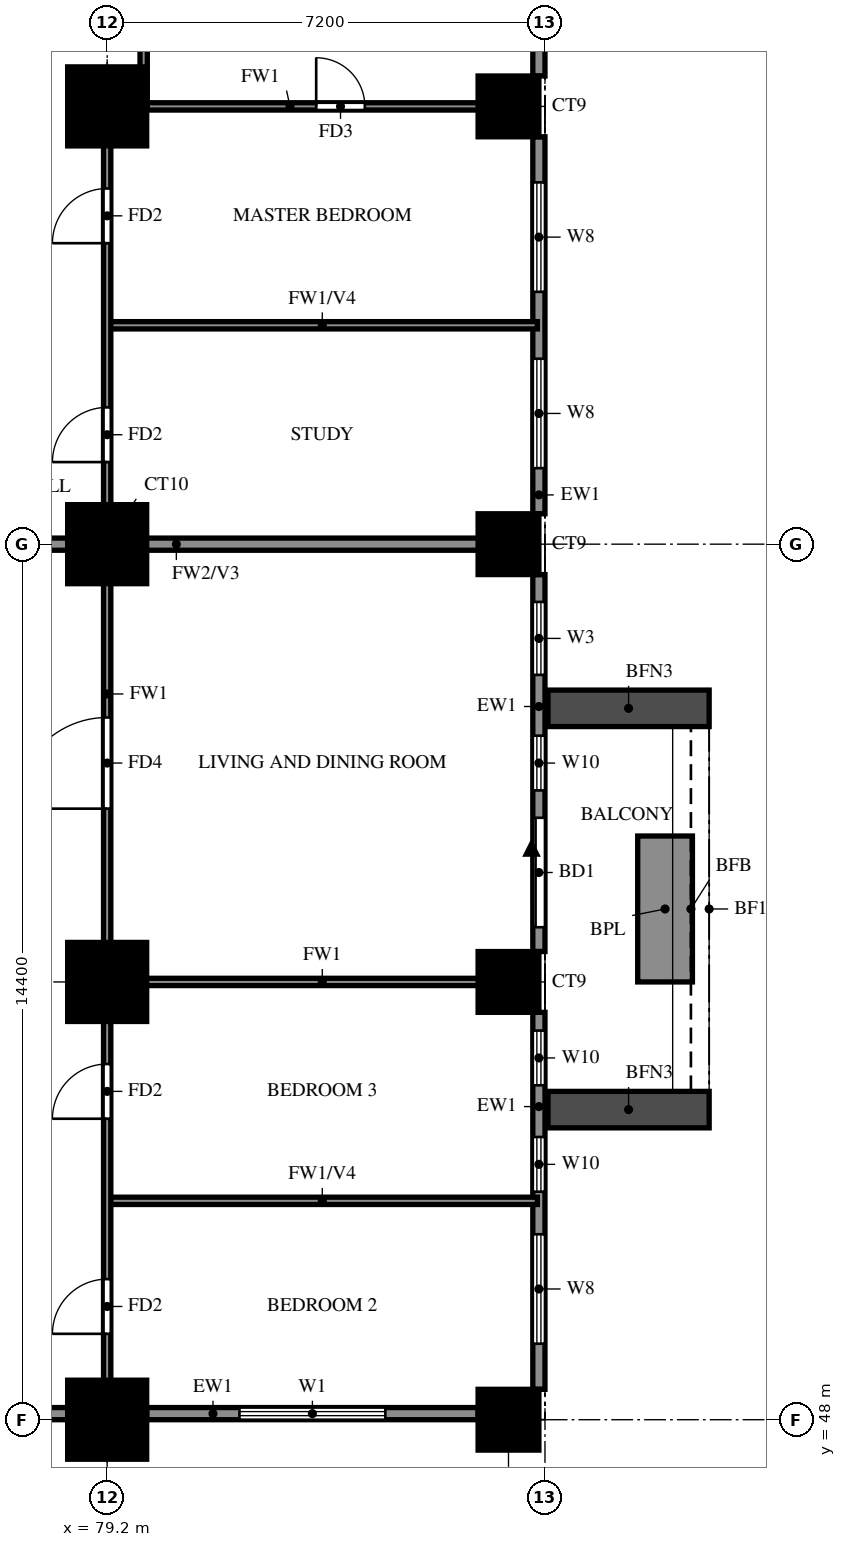
"""IFC4 building model, lengths in metres.
Left out: names, types, materials, properties, quantities, classifications, styles, units other than length and angle.
Written with IfcOpenShell. Run it as: python <this file> out.ifc"""

import sys

from ifc_helpers import new_model, si_unit, direction, frame, frame_2d, origin, origin_2d, place, context, subcontext, project, spatial, rectangle, extrude, source, transform, mapped, element, fill, save


model = new_model("IFC4")
c1 = context("Model", 3, precision=1e-05, world=origin(), true_north=direction((0.0, 1.0)))
c2 = subcontext(c1, "Body", "Model", "MODEL_VIEW")
j1 = project(units=[si_unit("LENGTHUNIT", "METRE"), si_unit("PLANEANGLEUNIT", "RADIAN")], contexts=[c1])
p1 = place(None, origin())
s1 = spatial("IfcSite", under=j1, at=p1, CompositionType="ELEMENT")
p2 = place(p1, origin())
s2 = spatial("IfcBuilding", under=s1, at=p2, CompositionType="ELEMENT")
p3 = place(p2, frame((0.0, 0.0, 69.0)))
s3 = spatial("IfcBuildingStorey", under=s2, at=p3, CompositionType="ELEMENT", Elevation=69.0)
m1 = source(origin(), c2, "Body", "SweptSolid", [
    extrude(rectangle(XDim=1.3, YDim=1.3, at=origin_2d()), origin(), (0.0, 0.0, 1.0), 3.18),
])
p4 = place(p3, frame((79.2, 48.0, 0.0), z_axis=(0.0, 0.0, 1.0), x_axis=(1.0, 0.0, 0.0)))
e1 = element("IfcColumn", 1, at=p4, inside=s3, PredefinedType="COLUMN", context=c2, shape_type="MappedRepresentation", body=[
    mapped(m1, transform((0.0, 0.0, 0.0))),
])
m2 = source(origin(), c2, "Body", "SweptSolid", [
    extrude(rectangle(XDim=1.0, YDim=1.0, at=origin_2d()), origin(), (0.0, 0.0, 1.0), 3.18),
])
p5 = place(p3, frame((85.8, 48.0, 0.0), z_axis=(0.0, 0.0, 1.0), x_axis=(1.0, 0.0, 0.0)))
e2 = element("IfcColumn", 2, at=p5, inside=s3, PredefinedType="COLUMN", context=c2, shape_type="MappedRepresentation", body=[
    mapped(m2, transform((0.0, 0.0, 0.0))),
])
p6 = place(p3, frame((79.2, 55.2, 0.0), z_axis=(0.0, 0.0, 1.0), x_axis=(1.0, 0.0, 0.0)))
e3 = element("IfcColumn", 3, at=p6, inside=s3, PredefinedType="COLUMN", context=c2, shape_type="MappedRepresentation", body=[
    mapped(m1, transform((0.0, 0.0, 0.0))),
])
p7 = place(p3, frame((85.8, 55.2, 0.0), z_axis=(0.0, 0.0, 1.0), x_axis=(1.0, 0.0, 0.0)))
e4 = element("IfcColumn", 4, at=p7, inside=s3, PredefinedType="COLUMN", context=c2, shape_type="MappedRepresentation", body=[
    mapped(m2, transform((0.0, 0.0, 0.0))),
])
p8 = place(p3, frame((79.2, 62.4, 0.0), z_axis=(0.0, 0.0, 1.0), x_axis=(1.0, 0.0, 0.0)))
e5 = element("IfcColumn", 5, at=p8, inside=s3, PredefinedType="COLUMN", context=c2, shape_type="MappedRepresentation", body=[
    mapped(m1, transform((0.0, 0.0, 0.0))),
])
p9 = place(p3, frame((85.8, 62.4, 0.0), z_axis=(0.0, 0.0, 1.0), x_axis=(1.0, 0.0, 0.0)))
e6 = element("IfcColumn", 6, at=p9, inside=s3, PredefinedType="COLUMN", context=c2, shape_type="MappedRepresentation", body=[
    mapped(m2, transform((0.0, 0.0, 0.0))),
])
p10 = place(p3, frame((79.2, 69.6, 0.0), z_axis=(0.0, 0.0, 1.0), x_axis=(1.0, 0.0, 0.0)))
e7 = element("IfcColumn", 7, at=p10, inside=s3, PredefinedType="COLUMN", context=c2, shape_type="MappedRepresentation", body=[
    mapped(m1, transform((0.0, 0.0, 0.0))),
])
p11 = place(p3, frame((85.8, 69.6, 0.0), z_axis=(0.0, 0.0, 1.0), x_axis=(1.0, 0.0, 0.0)))
e8 = element("IfcColumn", 8, at=p11, inside=s3, PredefinedType="COLUMN", context=c2, shape_type="MappedRepresentation", body=[
    mapped(m2, transform((0.0, 0.0, 0.0))),
])
p12 = place(p3, frame((85.996, 33.863, 0.0), z_axis=(0.0, 0.0, 1.0), x_axis=(-0.707100718496, 0.707112843825, 0.0)))
e9 = element("IfcWall", 9, at=p12, inside=s3, PredefinedType="SOLIDWALL", context=c2, shape_type="SweptSolid", body=[
    extrude(rectangle(XDim=20.135, YDim=0.2, at=frame_2d((10.067, 0.0))), origin(), (0.0, 0.0, 1.0), 3.18),
])
p13 = place(p3, frame((71.989, 48.1, 0.0), z_axis=(0.0, 0.0, 1.0), x_axis=(1.0, 0.0, 0.0)))
e10 = element("IfcWall", 10, at=p13, inside=s3, PredefinedType="SOLIDWALL", context=c2, shape_type="SweptSolid", body=[
    extrude(rectangle(XDim=6.562, YDim=0.2, at=frame_2d((3.281, 0.0))), origin(), (0.0, 0.0, 1.0), 3.18),
])
p14 = place(p3, frame((79.85, 48.1, 0.0), z_axis=(0.0, 0.0, 1.0), x_axis=(1.0, 0.0, 0.0)))
e11 = element("IfcWall", 11, at=p14, inside=s3, PredefinedType="SOLIDWALL", context=c2, shape_type="SweptSolid", body=[
    extrude(rectangle(XDim=5.45, YDim=0.2, at=frame_2d((2.725, 0.0))), origin(), (0.0, 0.0, 1.0), 3.18),
])
p15 = place(p14, frame((1.525, 0.0, 0.6)))
e12 = element("IfcOpeningElement", 12, at=p15, cuts=e11, PredefinedType="OPENING", context=c2, shape_type="SweptSolid", body=[
    extrude(rectangle(XDim=2.4, YDim=2.4, at=frame_2d((1.2, 1.2))), frame((0.0, 0.11, 0.0), z_axis=(0.0, -1.0, 0.0), x_axis=(1.0, 0.0, 0.0)), (0.0, 0.0, 1.0), 0.22),
])
p16 = place(p3, frame((86.3, 48.5, 0.0), z_axis=(0.0, 0.0, 1.0), x_axis=(0.0, 1.0, 0.0)))
e13 = element("IfcWall", 13, at=p16, inside=s3, PredefinedType="SOLIDWALL", context=c2, shape_type="SweptSolid", body=[
    extrude(rectangle(XDim=6.2, YDim=0.2, at=frame_2d((3.1, 0.0))), origin(), (0.0, 0.0, 1.0), 3.18),
])
p17 = place(p16, frame((0.75, 0.0, 0.6)))
e14 = element("IfcOpeningElement", 14, at=p17, cuts=e13, PredefinedType="OPENING", context=c2, shape_type="SweptSolid", body=[
    extrude(rectangle(XDim=1.8, YDim=2.4, at=frame_2d((0.9, 1.2))), frame((0.0, 0.11, 0.0), z_axis=(0.0, -1.0, 0.0), x_axis=(1.0, 0.0, 0.0)), (0.0, 0.0, 1.0), 0.22),
])
p18 = place(p16, frame((3.25, 0.0, 0.6)))
e15 = element("IfcOpeningElement", 15, at=p18, cuts=e13, PredefinedType="OPENING", context=c2, shape_type="SweptSolid", body=[
    extrude(rectangle(XDim=0.9, YDim=2.4, at=frame_2d((0.45, 1.2))), frame((0.0, 0.11, 0.0), z_axis=(0.0, -1.0, 0.0), x_axis=(1.0, 0.0, 0.0)), (0.0, 0.0, 1.0), 0.22),
])
p19 = place(p16, frame((5.0, 0.0, 0.6)))
e16 = element("IfcOpeningElement", 16, at=p19, cuts=e13, PredefinedType="OPENING", context=c2, shape_type="SweptSolid", body=[
    extrude(rectangle(XDim=0.9, YDim=2.4, at=frame_2d((0.45, 1.2))), frame((0.0, 0.11, 0.0), z_axis=(0.0, -1.0, 0.0), x_axis=(1.0, 0.0, 0.0)), (0.0, 0.0, 1.0), 0.22),
])
p20 = place(p3, frame((86.3, 55.7, 0.0), z_axis=(0.0, 0.0, 1.0), x_axis=(0.0, 1.0, 0.0)))
e17 = element("IfcWall", 17, at=p20, inside=s3, PredefinedType="SOLIDWALL", context=c2, shape_type="SweptSolid", body=[
    extrude(rectangle(XDim=6.2, YDim=0.2, at=frame_2d((3.1, 0.0))), origin(), (0.0, 0.0, 1.0), 3.18),
])
p21 = place(p20, frame((0.4, 0.0, 0.0)))
e18 = element("IfcOpeningElement", 18, at=p21, cuts=e17, PredefinedType="OPENING", context=c2, shape_type="SweptSolid", body=[
    extrude(rectangle(XDim=1.8, YDim=2.4, at=frame_2d((0.9, 1.2))), frame((0.0, 0.11, 0.0), z_axis=(0.0, -1.0, 0.0), x_axis=(1.0, 0.0, 0.0)), (0.0, 0.0, 1.0), 0.22),
])
p22 = place(p20, frame((2.65, 0.0, 0.6)))
e19 = element("IfcOpeningElement", 19, at=p22, cuts=e17, PredefinedType="OPENING", context=c2, shape_type="SweptSolid", body=[
    extrude(rectangle(XDim=0.9, YDim=2.4, at=frame_2d((0.45, 1.2))), frame((0.0, 0.11, 0.0), z_axis=(0.0, -1.0, 0.0), x_axis=(1.0, 0.0, 0.0)), (0.0, 0.0, 1.0), 0.22),
])
p23 = place(p20, frame((4.55, 0.0, 0.6)))
e20 = element("IfcOpeningElement", 20, at=p23, cuts=e17, PredefinedType="OPENING", context=c2, shape_type="SweptSolid", body=[
    extrude(rectangle(XDim=1.2, YDim=2.4, at=frame_2d((0.6, 1.2))), frame((0.0, 0.11, 0.0), z_axis=(0.0, -1.0, 0.0), x_axis=(1.0, 0.0, 0.0)), (0.0, 0.0, 1.0), 0.22),
])
p24 = place(p3, frame((86.3, 62.9, 0.0), z_axis=(0.0, 0.0, 1.0), x_axis=(0.0, 1.0, 0.0)))
e21 = element("IfcWall", 21, at=p24, inside=s3, PredefinedType="SOLIDWALL", context=c2, shape_type="SweptSolid", body=[
    extrude(rectangle(XDim=6.2, YDim=0.2, at=frame_2d((3.1, 0.0))), origin(), (0.0, 0.0, 1.0), 3.18),
])
p25 = place(p24, frame((0.75, 0.0, 0.6)))
e22 = element("IfcOpeningElement", 22, at=p25, cuts=e21, PredefinedType="OPENING", context=c2, shape_type="SweptSolid", body=[
    extrude(rectangle(XDim=1.8, YDim=2.4, at=frame_2d((0.9, 1.2))), frame((0.0, 0.11, 0.0), z_axis=(0.0, -1.0, 0.0), x_axis=(1.0, 0.0, 0.0)), (0.0, 0.0, 1.0), 0.22),
])
p26 = place(p24, frame((3.65, 0.0, 0.6)))
e23 = element("IfcOpeningElement", 23, at=p26, cuts=e21, PredefinedType="OPENING", context=c2, shape_type="SweptSolid", body=[
    extrude(rectangle(XDim=1.8, YDim=2.4, at=frame_2d((0.9, 1.2))), frame((0.0, 0.11, 0.0), z_axis=(0.0, -1.0, 0.0), x_axis=(1.0, 0.0, 0.0)), (0.0, 0.0, 1.0), 0.22),
])
p27 = place(p3, frame((86.3, 70.1, 0.0), z_axis=(0.0, 0.0, 1.0), x_axis=(0.0, 1.0, 0.0)))
e24 = element("IfcWall", 24, at=p27, inside=s3, PredefinedType="SOLIDWALL", context=c2, shape_type="SweptSolid", body=[
    extrude(rectangle(XDim=6.2, YDim=0.2, at=frame_2d((3.1, 0.0))), origin(), (0.0, 0.0, 1.0), 3.18),
])
p28 = place(p27, frame((1.2, 0.0, 1.5)))
e25 = element("IfcOpeningElement", 25, at=p28, cuts=e24, PredefinedType="OPENING", context=c2, shape_type="SweptSolid", body=[
    extrude(rectangle(XDim=0.9, YDim=0.9, at=frame_2d((0.45, 0.45))), frame((0.0, 0.11, 0.0), z_axis=(0.0, -1.0, 0.0), x_axis=(1.0, 0.0, 0.0)), (0.0, 0.0, 1.0), 0.22),
])
p29 = place(p27, frame((3.65, 0.0, 0.6)))
e26 = element("IfcOpeningElement", 26, at=p29, cuts=e24, PredefinedType="OPENING", context=c2, shape_type="SweptSolid", body=[
    extrude(rectangle(XDim=1.8, YDim=2.4, at=frame_2d((0.9, 1.2))), frame((0.0, 0.11, 0.0), z_axis=(0.0, -1.0, 0.0), x_axis=(1.0, 0.0, 0.0)), (0.0, 0.0, 1.0), 0.22),
])
for number, where, z_axis, x_axis in (
    (27, (86.45, 53.1, 0.0), (0.0, 0.0, 1.0), (1.0, 0.0, 0.0)),
    (28, (86.45, 59.7, 0.0), (0.0, 0.0, 1.0), (1.0, 0.0, 0.0)),
):
    element("IfcWall", number, at=place(p3, frame(where, z_axis=z_axis, x_axis=x_axis)), inside=s3, PredefinedType="SOLIDWALL", context=c2, shape_type="SweptSolid", body=[
        extrude(rectangle(XDim=2.65, YDim=0.6, at=frame_2d((1.325, 0.0))), origin(), (0.0, 0.0, 1.0), 2.85),
    ])
p30 = place(p3, frame((88.375, 55.2, 0.0), z_axis=(0.0, 0.0, 1.0), x_axis=(0.0, 1.0, 0.0)))
e29 = element("IfcWall", 29, at=p30, inside=s3, PredefinedType="SOLIDWALL", context=c2, shape_type="SweptSolid", body=[
    extrude(rectangle(XDim=2.4, YDim=0.9, at=frame_2d((1.2, 0.0))), origin(), (0.0, 0.0, 1.0), 0.9),
])
p31 = place(p3, frame((74.4, 62.4, 0.0), z_axis=(0.0, 0.0, 1.0), x_axis=(1.0, 0.0, 0.0)))
e30 = element("IfcWall", 30, at=p31, inside=s3, PredefinedType="SOLIDWALL", context=c2, shape_type="SweptSolid", body=[
    extrude(rectangle(XDim=11.875, YDim=0.2, at=frame_2d((5.938, 0.0))), origin(), (0.0, 0.0, 1.0), 3.18),
])
p32 = place(p3, frame((79.2, 51.6, 0.0), z_axis=(0.0, 0.0, 1.0), x_axis=(1.0, 0.0, 0.0)))
e31 = element("IfcWall", 31, at=p32, inside=s3, PredefinedType="PARTITIONING", context=c2, shape_type="SweptSolid", body=[
    extrude(rectangle(XDim=7.075, YDim=0.12, at=frame_2d((3.538, 0.0))), origin(), (0.0, 0.0, 1.0), 2.28),
])
p33 = place(p3, frame((79.2, 55.2, 0.0), z_axis=(0.0, 0.0, 1.0), x_axis=(1.0, 0.0, 0.0)))
e32 = element("IfcWall", 32, at=p33, inside=s3, PredefinedType="PARTITIONING", context=c2, shape_type="SweptSolid", body=[
    extrude(rectangle(XDim=7.075, YDim=0.12, at=frame_2d((3.538, 0.0))), origin(), (0.0, 0.0, 1.0), 3.18),
])
p34 = place(p3, frame((79.2, 66.0, 0.0), z_axis=(0.0, 0.0, 1.0), x_axis=(1.0, 0.0, 0.0)))
e33 = element("IfcWall", 33, at=p34, inside=s3, PredefinedType="PARTITIONING", context=c2, shape_type="SweptSolid", body=[
    extrude(rectangle(XDim=7.075, YDim=0.12, at=frame_2d((3.538, 0.0))), origin(), (0.0, 0.0, 1.0), 2.28),
])
p35 = place(p3, frame((79.2, 69.6, 0.0), z_axis=(0.0, 0.0, 1.0), x_axis=(1.0, 0.0, 0.0)))
e34 = element("IfcWall", 34, at=p35, inside=s3, PredefinedType="PARTITIONING", context=c2, shape_type="SweptSolid", body=[
    extrude(rectangle(XDim=7.075, YDim=0.12, at=frame_2d((3.538, 0.0))), origin(), (0.0, 0.0, 1.0), 3.18),
])
p36 = place(p35, frame((3.438, 0.0, 0.0)))
e35 = element("IfcOpeningElement", 35, at=p36, cuts=e34, PredefinedType="OPENING", context=c2, shape_type="SweptSolid", body=[
    extrude(rectangle(XDim=0.8, YDim=2.1, at=frame_2d((0.4, 1.05))), frame((0.0, 0.07, 0.0), z_axis=(0.0, -1.0, 0.0), x_axis=(1.0, 0.0, 0.0)), (0.0, 0.0, 1.0), 0.14),
])
p37 = place(p3, frame((79.2, 48.125, 0.0), z_axis=(0.0, 0.0, 1.0), x_axis=(0.0, 1.0, 0.0)))
e36 = element("IfcWall", 36, at=p37, inside=s3, PredefinedType="PARTITIONING", context=c2, shape_type="SweptSolid", body=[
    extrude(rectangle(XDim=21.475, YDim=0.12, at=frame_2d((10.738, 0.0))), origin(), (0.0, 0.0, 1.0), 3.18),
])
p38 = place(p37, frame((1.288, 0.0, 0.0)))
e37 = element("IfcOpeningElement", 37, at=p38, cuts=e36, PredefinedType="OPENING", context=c2, shape_type="SweptSolid", body=[
    extrude(rectangle(XDim=0.9, YDim=2.1, at=frame_2d((0.45, 1.05))), frame((0.0, 0.07, 0.0), z_axis=(0.0, -1.0, 0.0), x_axis=(1.0, 0.0, 0.0)), (0.0, 0.0, 1.0), 0.14),
])
p39 = place(p37, frame((4.825, 0.0, 0.0)))
e38 = element("IfcOpeningElement", 38, at=p39, cuts=e36, PredefinedType="OPENING", context=c2, shape_type="SweptSolid", body=[
    extrude(rectangle(XDim=0.9, YDim=2.1, at=frame_2d((0.45, 1.05))), frame((0.0, 0.07, 0.0), z_axis=(0.0, -1.0, 0.0), x_axis=(1.0, 0.0, 0.0)), (0.0, 0.0, 1.0), 0.14),
])
p40 = place(p37, frame((9.925, 0.0, 0.0)))
e39 = element("IfcOpeningElement", 39, at=p40, cuts=e36, PredefinedType="OPENING", context=c2, shape_type="SweptSolid", body=[
    extrude(rectangle(XDim=1.5, YDim=2.1, at=frame_2d((0.75, 1.05))), frame((0.0, 0.07, 0.0), z_axis=(0.0, -1.0, 0.0), x_axis=(1.0, 0.0, 0.0)), (0.0, 0.0, 1.0), 0.14),
])
p41 = place(p37, frame((15.625, 0.0, 0.0)))
e40 = element("IfcOpeningElement", 40, at=p41, cuts=e36, PredefinedType="OPENING", context=c2, shape_type="SweptSolid", body=[
    extrude(rectangle(XDim=0.9, YDim=2.1, at=frame_2d((0.45, 1.05))), frame((0.0, 0.07, 0.0), z_axis=(0.0, -1.0, 0.0), x_axis=(1.0, 0.0, 0.0)), (0.0, 0.0, 1.0), 0.14),
])
p42 = place(p37, frame((19.225, 0.0, 0.0)))
e41 = element("IfcOpeningElement", 41, at=p42, cuts=e36, PredefinedType="OPENING", context=c2, shape_type="SweptSolid", body=[
    extrude(rectangle(XDim=0.9, YDim=2.1, at=frame_2d((0.45, 1.05))), frame((0.0, 0.07, 0.0), z_axis=(0.0, -1.0, 0.0), x_axis=(1.0, 0.0, 0.0)), (0.0, 0.0, 1.0), 0.14),
])
p43 = place(p3, frame((79.8, 69.6, 0.0), z_axis=(0.0, 0.0, 1.0), x_axis=(0.0, 1.0, 0.0)))
e42 = element("IfcWall", 42, at=p43, inside=s3, PredefinedType="PARTITIONING", context=c2, shape_type="SweptSolid", body=[
    extrude(rectangle(XDim=3.6, YDim=0.12, at=frame_2d((1.8, 0.0))), origin(), (0.0, 0.0, 1.0), 3.18),
])
p44 = place(p15, origin())
e43 = element("IfcWindow", 43, at=p44, inside=s3, PartitioningType="DOUBLE_PANEL_VERTICAL", PredefinedType="WINDOW", context=c2, shape_type="SweptSolid", body=[
    extrude(rectangle(XDim=2.4, YDim=2.4, at=frame_2d((1.2, 1.2))), frame((0.0, 0.03, 0.0), z_axis=(0.0, -1.0, 0.0), x_axis=(1.0, 0.0, 0.0)), (0.0, 0.0, 1.0), 0.06),
])
fill(e12, e43)
p45 = place(p17, origin())
e44 = element("IfcWindow", 44, at=p45, inside=s3, PartitioningType="DOUBLE_PANEL_VERTICAL", PredefinedType="WINDOW", context=c2, shape_type="SweptSolid", body=[
    extrude(rectangle(XDim=1.8, YDim=2.4, at=frame_2d((0.9, 1.2))), frame((0.0, 0.03, 0.0), z_axis=(0.0, -1.0, 0.0), x_axis=(1.0, 0.0, 0.0)), (0.0, 0.0, 1.0), 0.06),
])
fill(e14, e44)
p46 = place(p18, origin())
e45 = element("IfcWindow", 45, at=p46, inside=s3, PartitioningType="SINGLE_PANEL", PredefinedType="WINDOW", context=c2, shape_type="SweptSolid", body=[
    extrude(rectangle(XDim=0.9, YDim=2.4, at=frame_2d((0.45, 1.2))), frame((0.0, 0.03, 0.0), z_axis=(0.0, -1.0, 0.0), x_axis=(1.0, 0.0, 0.0)), (0.0, 0.0, 1.0), 0.06),
])
fill(e15, e45)
p47 = place(p19, origin())
e46 = element("IfcWindow", 46, at=p47, inside=s3, PartitioningType="SINGLE_PANEL", PredefinedType="WINDOW", context=c2, shape_type="SweptSolid", body=[
    extrude(rectangle(XDim=0.9, YDim=2.4, at=frame_2d((0.45, 1.2))), frame((0.0, 0.03, 0.0), z_axis=(0.0, -1.0, 0.0), x_axis=(1.0, 0.0, 0.0)), (0.0, 0.0, 1.0), 0.06),
])
fill(e16, e46)
p48 = place(p21, origin())
e47 = element("IfcDoor", 47, at=p48, inside=s3, OperationType="DOUBLE_DOOR_SLIDING", PredefinedType="DOOR", context=c2, shape_type="SweptSolid", body=[
    extrude(rectangle(XDim=1.8, YDim=2.4, at=frame_2d((0.9, 1.2))), frame((0.0, 0.025, 0.0), z_axis=(0.0, -1.0, 0.0), x_axis=(1.0, 0.0, 0.0)), (0.0, 0.0, 1.0), 0.05),
])
fill(e18, e47)
p49 = place(p22, origin())
e48 = element("IfcWindow", 48, at=p49, inside=s3, PartitioningType="SINGLE_PANEL", PredefinedType="WINDOW", context=c2, shape_type="SweptSolid", body=[
    extrude(rectangle(XDim=0.9, YDim=2.4, at=frame_2d((0.45, 1.2))), frame((0.0, 0.03, 0.0), z_axis=(0.0, -1.0, 0.0), x_axis=(1.0, 0.0, 0.0)), (0.0, 0.0, 1.0), 0.06),
])
fill(e19, e48)
p50 = place(p23, origin())
e49 = element("IfcWindow", 49, at=p50, inside=s3, PartitioningType="SINGLE_PANEL", PredefinedType="WINDOW", context=c2, shape_type="SweptSolid", body=[
    extrude(rectangle(XDim=1.2, YDim=2.4, at=frame_2d((0.6, 1.2))), frame((0.0, 0.03, 0.0), z_axis=(0.0, -1.0, 0.0), x_axis=(1.0, 0.0, 0.0)), (0.0, 0.0, 1.0), 0.06),
])
fill(e20, e49)
p51 = place(p25, origin())
e50 = element("IfcWindow", 50, at=p51, inside=s3, PartitioningType="DOUBLE_PANEL_VERTICAL", PredefinedType="WINDOW", context=c2, shape_type="SweptSolid", body=[
    extrude(rectangle(XDim=1.8, YDim=2.4, at=frame_2d((0.9, 1.2))), frame((0.0, 0.03, 0.0), z_axis=(0.0, -1.0, 0.0), x_axis=(1.0, 0.0, 0.0)), (0.0, 0.0, 1.0), 0.06),
])
fill(e22, e50)
p52 = place(p26, origin())
e51 = element("IfcWindow", 51, at=p52, inside=s3, PartitioningType="DOUBLE_PANEL_VERTICAL", PredefinedType="WINDOW", context=c2, shape_type="SweptSolid", body=[
    extrude(rectangle(XDim=1.8, YDim=2.4, at=frame_2d((0.9, 1.2))), frame((0.0, 0.03, 0.0), z_axis=(0.0, -1.0, 0.0), x_axis=(1.0, 0.0, 0.0)), (0.0, 0.0, 1.0), 0.06),
])
fill(e23, e51)
p53 = place(p38, origin())
e52 = element("IfcDoor", 52, at=p53, inside=s3, OperationType="SINGLE_SWING_LEFT", PredefinedType="DOOR", context=c2, shape_type="SweptSolid", body=[
    extrude(rectangle(XDim=0.9, YDim=2.1, at=frame_2d((0.45, 1.05))), frame((0.0, 0.025, 0.0), z_axis=(0.0, -1.0, 0.0), x_axis=(1.0, 0.0, 0.0)), (0.0, 0.0, 1.0), 0.05),
])
fill(e37, e52)
p54 = place(p39, origin())
e53 = element("IfcDoor", 53, at=p54, inside=s3, OperationType="SINGLE_SWING_LEFT", PredefinedType="DOOR", context=c2, shape_type="SweptSolid", body=[
    extrude(rectangle(XDim=0.9, YDim=2.1, at=frame_2d((0.45, 1.05))), frame((0.0, 0.025, 0.0), z_axis=(0.0, -1.0, 0.0), x_axis=(1.0, 0.0, 0.0)), (0.0, 0.0, 1.0), 0.05),
])
fill(e38, e53)
p55 = place(p40, origin())
e54 = element("IfcDoor", 54, at=p55, inside=s3, OperationType="SINGLE_SWING_RIGHT", PredefinedType="DOOR", context=c2, shape_type="SweptSolid", body=[
    extrude(rectangle(XDim=1.5, YDim=2.1, at=frame_2d((0.75, 1.05))), frame((0.0, 0.025, 0.0), z_axis=(0.0, -1.0, 0.0), x_axis=(1.0, 0.0, 0.0)), (0.0, 0.0, 1.0), 0.05),
])
fill(e39, e54)
p56 = place(p41, origin())
e55 = element("IfcDoor", 55, at=p56, inside=s3, OperationType="SINGLE_SWING_RIGHT", PredefinedType="DOOR", context=c2, shape_type="SweptSolid", body=[
    extrude(rectangle(XDim=0.9, YDim=2.1, at=frame_2d((0.45, 1.05))), frame((0.0, 0.025, 0.0), z_axis=(0.0, -1.0, 0.0), x_axis=(1.0, 0.0, 0.0)), (0.0, 0.0, 1.0), 0.05),
])
fill(e40, e55)
p57 = place(p42, origin())
e56 = element("IfcDoor", 56, at=p57, inside=s3, OperationType="SINGLE_SWING_LEFT", PredefinedType="DOOR", context=c2, shape_type="SweptSolid", body=[
    extrude(rectangle(XDim=0.9, YDim=2.1, at=frame_2d((0.45, 1.05))), frame((0.0, 0.025, 0.0), z_axis=(0.0, -1.0, 0.0), x_axis=(1.0, 0.0, 0.0)), (0.0, 0.0, 1.0), 0.05),
])
fill(e41, e56)
p58 = place(p36, origin())
e57 = element("IfcDoor", 57, at=p58, inside=s3, OperationType="SINGLE_SWING_LEFT", PredefinedType="DOOR", context=c2, shape_type="SweptSolid", body=[
    extrude(rectangle(XDim=0.8, YDim=2.1, at=frame_2d((0.4, 1.05))), frame((0.0, 0.025, 0.0), z_axis=(0.0, -1.0, 0.0), x_axis=(1.0, 0.0, 0.0)), (0.0, 0.0, 1.0), 0.05),
])
fill(e35, e57)
save(model, sys.argv[1])
